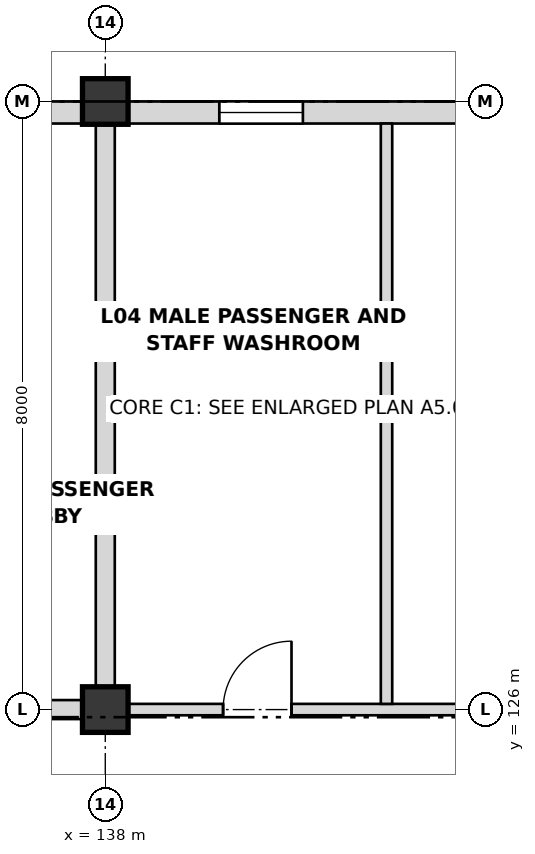
"""IFC4 building model, lengths in metres.
Left out: names, types, materials, properties, quantities, classifications, styles, units other than length and angle.
Written with IfcOpenShell. Run it as: python <this file> out.ifc"""

import sys

from ifc_helpers import new_model, si_unit, direction, frame, frame_2d, origin, origin_2d, place, context, subcontext, project, spatial, rectangle, extrude, element, fill, save


model = new_model("IFC4")
c1 = context("Model", 3, precision=1e-05, world=origin(), true_north=direction((0.0, 1.0)))
c2 = subcontext(c1, "Body", "Model", "MODEL_VIEW")
j1 = project(units=[si_unit("LENGTHUNIT", "METRE"), si_unit("PLANEANGLEUNIT", "RADIAN")], contexts=[c1])
p1 = place(None, origin())
s1 = spatial("IfcSite", under=j1, at=p1, CompositionType="ELEMENT")
p2 = place(p1, origin())
s2 = spatial("IfcBuilding", under=s1, at=p2, CompositionType="ELEMENT")
p3 = place(p2, frame((0.0, 0.0, 18.6)))
s3 = spatial("IfcBuildingStorey", under=s2, at=p3, CompositionType="ELEMENT", Elevation=18.6)
for number, where, z_axis, x_axis in (
    (1, (138.0, 126.0, 0.0), (0.0, 0.0, 1.0), (1.0, 0.0, 0.0)),
    (2, (138.0, 134.0, 0.0), (0.0, 0.0, 1.0), (1.0, 0.0, 0.0)),
):
    element("IfcColumn", number, at=place(p3, frame(where, z_axis=z_axis, x_axis=x_axis)), inside=s3, PredefinedType="COLUMN", context=c2, shape_type="SweptSolid", body=[
        extrude(rectangle(XDim=0.6, YDim=0.6, at=origin_2d()), origin(), (0.0, 0.0, 1.0), 4.2),
    ])
p4 = place(p3, frame((128.295, 133.855, 0.0), z_axis=(0.0, 0.0, 1.0), x_axis=(1.0, 0.0, 0.0)))
e3 = element("IfcWall", 3, at=p4, inside=s3, PredefinedType="SOLIDWALL", context=c2, shape_type="SweptSolid", body=[
    extrude(rectangle(XDim=9.41, YDim=0.29, at=frame_2d((4.705, 0.0))), origin(), (0.0, 0.0, 1.0), 3.188),
])
p5 = place(p4, frame((3.455, 0.0, 1.05)))
e4 = element("IfcOpeningElement", 4, at=p5, cuts=e3, PredefinedType="OPENING", context=c2, shape_type="SweptSolid", body=[
    extrude(rectangle(XDim=0.9, YDim=1.15, at=frame_2d((0.45, 0.575))), frame((0.0, 0.155, 0.0), z_axis=(0.0, -1.0, 0.0), x_axis=(1.0, 0.0, 0.0)), (0.0, 0.0, 1.0), 0.31),
])
p6 = place(p3, frame((138.295, 133.855, 0.0), z_axis=(0.0, 0.0, 1.0), x_axis=(1.0, 0.0, 0.0)))
e5 = element("IfcWall", 5, at=p6, inside=s3, PredefinedType="SOLIDWALL", context=c2, shape_type="SweptSolid", body=[
    extrude(rectangle(XDim=9.41, YDim=0.29, at=frame_2d((4.705, 0.0))), origin(), (0.0, 0.0, 1.0), 3.188),
])
p7 = place(p6, frame((1.205, 0.0, 1.25)))
e6 = element("IfcOpeningElement", 6, at=p7, cuts=e5, PredefinedType="OPENING", context=c2, shape_type="SweptSolid", body=[
    extrude(rectangle(XDim=1.1, YDim=1.15, at=frame_2d((0.55, 0.575))), frame((0.0, 0.155, 0.0), z_axis=(0.0, -1.0, 0.0), x_axis=(1.0, 0.0, 0.0)), (0.0, 0.0, 1.0), 0.31),
])
p8 = place(p6, frame((4.505, 0.0, 1.25)))
e7 = element("IfcOpeningElement", 7, at=p8, cuts=e5, PredefinedType="OPENING", context=c2, shape_type="SweptSolid", body=[
    extrude(rectangle(XDim=1.3, YDim=1.15, at=frame_2d((0.65, 0.575))), frame((0.0, 0.155, 0.0), z_axis=(0.0, -1.0, 0.0), x_axis=(1.0, 0.0, 0.0)), (0.0, 0.0, 1.0), 0.31),
])
p9 = place(p6, frame((7.705, 0.0, 1.25)))
e8 = element("IfcOpeningElement", 8, at=p9, cuts=e5, PredefinedType="OPENING", context=c2, shape_type="SweptSolid", body=[
    extrude(rectangle(XDim=0.9, YDim=1.4, at=frame_2d((0.45, 0.7))), frame((0.0, 0.155, 0.0), z_axis=(0.0, -1.0, 0.0), x_axis=(1.0, 0.0, 0.0)), (0.0, 0.0, 1.0), 0.31),
])
p10 = place(p3, frame((128.305, 126.0, 0.0), z_axis=(0.0, 0.0, 1.0), x_axis=(1.0, 0.0, 0.0)))
e9 = element("IfcWall", 9, at=p10, inside=s3, PredefinedType="PARTITIONING", context=c2, shape_type="SweptSolid", body=[
    extrude(rectangle(XDim=9.39, YDim=0.25, at=frame_2d((4.695, 0.0))), origin(), (0.0, 0.0, 1.0), 3.188),
])
p11 = place(p10, frame((1.87, 0.0, 0.0)))
e10 = element("IfcOpeningElement", 10, at=p11, cuts=e9, PredefinedType="OPENING", context=c2, shape_type="SweptSolid", body=[
    extrude(rectangle(XDim=1.25, YDim=2.15, at=frame_2d((0.625, 1.075))), frame((0.0, 0.135, 0.0), z_axis=(0.0, -1.0, 0.0), x_axis=(1.0, 0.0, 0.0)), (0.0, 0.0, 1.0), 0.27),
])
p12 = place(p10, frame((6.345, 0.0, 0.0)))
e11 = element("IfcOpeningElement", 11, at=p12, cuts=e9, PredefinedType="OPENING", context=c2, shape_type="SweptSolid", body=[
    extrude(rectangle(XDim=1.1, YDim=2.15, at=frame_2d((0.55, 1.075))), frame((0.0, 0.135, 0.0), z_axis=(0.0, -1.0, 0.0), x_axis=(1.0, 0.0, 0.0)), (0.0, 0.0, 1.0), 0.27),
])
p13 = place(p3, frame((138.305, 126.0, 0.0), z_axis=(0.0, 0.0, 1.0), x_axis=(1.0, 0.0, 0.0)))
e12 = element("IfcWall", 12, at=p13, inside=s3, PredefinedType="PARTITIONING", context=c2, shape_type="SweptSolid", body=[
    extrude(rectangle(XDim=9.39, YDim=0.15, at=frame_2d((4.695, 0.0))), origin(), (0.0, 0.0, 1.0), 3.188),
])
p14 = place(p13, frame((1.245, 0.0, 0.0)))
e13 = element("IfcOpeningElement", 13, at=p14, cuts=e12, PredefinedType="OPENING", context=c2, shape_type="SweptSolid", body=[
    extrude(rectangle(XDim=0.9, YDim=2.05, at=frame_2d((0.45, 1.025))), frame((0.0, 0.085, 0.0), z_axis=(0.0, -1.0, 0.0), x_axis=(1.0, 0.0, 0.0)), (0.0, 0.0, 1.0), 0.17),
])
p15 = place(p13, frame((4.62, 0.0, 0.0)))
e14 = element("IfcOpeningElement", 14, at=p15, cuts=e12, PredefinedType="OPENING", context=c2, shape_type="SweptSolid", body=[
    extrude(rectangle(XDim=0.95, YDim=2.05, at=frame_2d((0.475, 1.025))), frame((0.0, 0.085, 0.0), z_axis=(0.0, -1.0, 0.0), x_axis=(1.0, 0.0, 0.0)), (0.0, 0.0, 1.0), 0.17),
])
p16 = place(p13, frame((7.595, 0.0, 0.0)))
e15 = element("IfcOpeningElement", 15, at=p16, cuts=e12, PredefinedType="OPENING", context=c2, shape_type="SweptSolid", body=[
    extrude(rectangle(XDim=1.0, YDim=2.05, at=frame_2d((0.5, 1.025))), frame((0.0, 0.085, 0.0), z_axis=(0.0, -1.0, 0.0), x_axis=(1.0, 0.0, 0.0)), (0.0, 0.0, 1.0), 0.17),
])
p17 = place(p3, frame((141.7, 126.075, 0.0), z_axis=(0.0, 0.0, 1.0), x_axis=(0.0, 1.0, 0.0)))
e16 = element("IfcWall", 16, at=p17, inside=s3, PredefinedType="PARTITIONING", context=c2, shape_type="SweptSolid", body=[
    extrude(rectangle(XDim=7.635, YDim=0.15, at=frame_2d((3.817, 0.0))), origin(), (0.0, 0.0, 1.0), 3.188),
])
p18 = place(p3, frame((138.0, 126.305, 0.0), z_axis=(0.0, 0.0, 1.0), x_axis=(0.0, 1.0, 0.0)))
e17 = element("IfcWall", 17, at=p18, inside=s3, PredefinedType="PARTITIONING", context=c2, shape_type="SweptSolid", body=[
    extrude(rectangle(XDim=7.39, YDim=0.25, at=frame_2d((3.695, 0.0))), origin(), (0.0, 0.0, 1.0), 3.188),
])
p19 = place(p7, origin())
e18 = element("IfcWindow", 18, at=p19, inside=s3, PartitioningType="SINGLE_PANEL", PredefinedType="WINDOW", context=c2, shape_type="SweptSolid", body=[
    extrude(rectangle(XDim=1.1, YDim=1.15, at=frame_2d((0.55, 0.575))), frame((0.0, 0.03, 0.0), z_axis=(0.0, -1.0, 0.0), x_axis=(1.0, 0.0, 0.0)), (0.0, 0.0, 1.0), 0.06),
])
fill(e6, e18)
p20 = place(p14, origin())
e19 = element("IfcDoor", 19, at=p20, inside=s3, OperationType="SINGLE_SWING_RIGHT", PredefinedType="DOOR", context=c2, shape_type="SweptSolid", body=[
    extrude(rectangle(XDim=0.9, YDim=2.05, at=frame_2d((0.45, 1.025))), frame((0.0, 0.025, 0.0), z_axis=(0.0, -1.0, 0.0), x_axis=(1.0, 0.0, 0.0)), (0.0, 0.0, 1.0), 0.05),
])
fill(e13, e19)
save(model, sys.argv[1])
